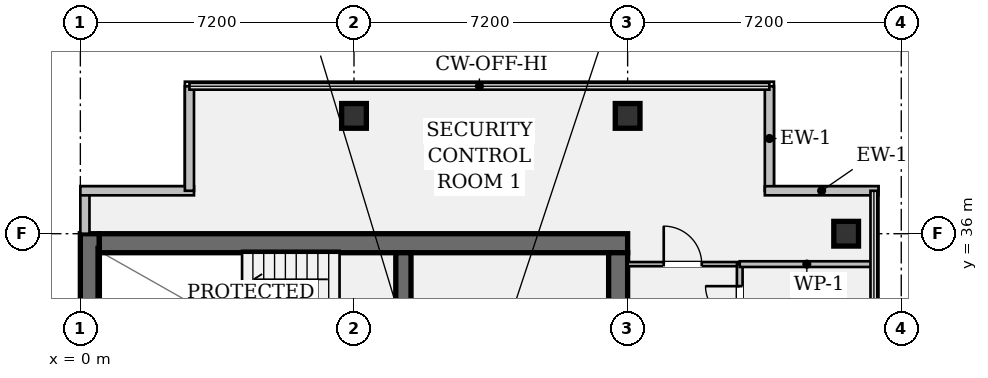
"""IFC4 building model, lengths in metres.
Left out: names, types, materials, properties, quantities, classifications, styles, units other than length and angle.
Written with IfcOpenShell. Run it as: python <this file> out.ifc"""

import sys

from ifc_helpers import new_model, si_unit, direction, frame, frame_2d, origin, origin_2d, place, context, subcontext, project, spatial, rectangle, hollow_rectangle, extrude, element, fill, save


model = new_model("IFC4")
c1 = context("Model", 3, precision=1e-05, world=origin(), true_north=direction((0.0, 1.0)))
c2 = subcontext(c1, "Body", "Model", "MODEL_VIEW")
j1 = project(units=[si_unit("LENGTHUNIT", "METRE"), si_unit("PLANEANGLEUNIT", "RADIAN")], contexts=[c1])
p1 = place(None, origin())
s1 = spatial("IfcSite", under=j1, at=p1, CompositionType="ELEMENT")
p2 = place(p1, origin())
s2 = spatial("IfcBuilding", under=s1, at=p2, CompositionType="ELEMENT")
p3 = place(p2, frame((0.0, 0.0, 244.65)))
s3 = spatial("IfcBuildingStorey", under=s2, at=p3, CompositionType="ELEMENT", Elevation=244.65)
p4 = place(p3, frame((0.25, 7.2, 0.0), z_axis=(0.0, 0.0, 1.0), x_axis=(0.0, 1.0, 0.0)))
e1 = element("IfcWall", 1, at=p4, inside=s3, PredefinedType="SHEAR", context=c2, shape_type="SweptSolid", body=[
    extrude(rectangle(XDim=28.8, YDim=0.5, at=frame_2d((14.4, 0.0))), origin(), (0.0, 0.0, 1.0), 3.24),
])
p5 = place(p3, frame((0.5, 35.75, 0.0), z_axis=(0.0, 0.0, 1.0), x_axis=(1.0, 0.0, 0.0)))
e2 = element("IfcWall", 2, at=p5, inside=s3, PredefinedType="SHEAR", context=c2, shape_type="SweptSolid", body=[
    extrude(rectangle(XDim=13.9, YDim=0.5, at=frame_2d((6.95, 0.0))), origin(), (0.0, 0.0, 1.0), 3.24),
])
p6 = place(p3, frame((14.15, 35.5, 0.0), z_axis=(0.0, 0.0, 1.0), x_axis=(0.0, -1.0, 0.0)))
e3 = element("IfcWall", 3, at=p6, inside=s3, PredefinedType="SHEAR", context=c2, shape_type="SweptSolid", body=[
    extrude(rectangle(XDim=27.8, YDim=0.5, at=frame_2d((13.9, 0.0))), origin(), (0.0, 0.0, 1.0), 3.24),
])
p7 = place(p6, frame((1.4, 0.0, 0.0)))
e4 = element("IfcOpeningElement", 4, at=p7, cuts=e3, PredefinedType="OPENING", context=c2, shape_type="SweptSolid", body=[
    extrude(rectangle(XDim=1.2, YDim=2.15, at=frame_2d((0.6, 1.075))), frame((0.0, 0.262, 0.0), z_axis=(0.0, -1.0, 0.0), x_axis=(1.0, 0.0, 0.0)), (0.0, 0.0, 1.0), 0.524),
])
p8 = place(p6, frame((25.35, 0.0, 0.0)))
e5 = element("IfcOpeningElement", 5, at=p8, cuts=e3, PredefinedType="OPENING", context=c2, shape_type="SweptSolid", body=[
    extrude(rectangle(XDim=1.2, YDim=2.15, at=frame_2d((0.6, 1.075))), frame((0.0, 0.262, 0.0), z_axis=(0.0, -1.0, 0.0), x_axis=(1.0, 0.0, 0.0)), (0.0, 0.0, 1.0), 0.524),
])
p9 = place(p6, frame((14.7, 0.0, 0.0)))
e6 = element("IfcOpeningElement", 6, at=p9, cuts=e3, PredefinedType="OPENING", context=c2, shape_type="SweptSolid", body=[
    extrude(rectangle(XDim=1.6, YDim=2.2, at=frame_2d((0.8, 1.1))), frame((0.0, 0.262, 0.0), z_axis=(0.0, -1.0, 0.0), x_axis=(1.0, 0.0, 0.0)), (0.0, 0.0, 1.0), 0.524),
])
p10 = place(p3, frame((8.5, 31.72, 0.0), z_axis=(0.0, 0.0, 1.0), x_axis=(0.0, 1.0, 0.0)))
e7 = element("IfcWall", 7, at=p10, inside=s3, PredefinedType="SHEAR", context=c2, shape_type="SweptSolid", body=[
    extrude(rectangle(XDim=3.78, YDim=0.4, at=frame_2d((1.89, 0.0))), origin(), (0.0, 0.0, 1.0), 3.24),
])
p11 = place(p10, frame((0.9, 0.0, 0.0)))
e8 = element("IfcOpeningElement", 8, at=p11, cuts=e7, PredefinedType="OPENING", context=c2, shape_type="SweptSolid", body=[
    extrude(rectangle(XDim=1.1, YDim=2.15, at=frame_2d((0.55, 1.075))), frame((0.0, 0.212, 0.0), z_axis=(0.0, -1.0, 0.0), x_axis=(1.0, 0.0, 0.0)), (0.0, 0.0, 1.0), 0.424),
])
for number, where, z_axis, x_axis in (
    (9, (7.2, 39.1, 0.0), (0.0, 0.0, 1.0), (1.0, 0.0, 0.0)),
    (10, (14.4, 39.1, 0.0), (0.0, 0.0, 1.0), (1.0, 0.0, 0.0)),
    (11, (20.15, 36.0, 0.0), (0.0, 0.0, 1.0), (1.0, 0.0, 0.0)),
):
    element("IfcColumn", number, at=place(p3, frame(where, z_axis=z_axis, x_axis=x_axis)), inside=s3, PredefinedType="COLUMN", context=c2, shape_type="SweptSolid", body=[
        extrude(hollow_rectangle(XDim=0.65, YDim=0.65, WallThickness=0.04, at=origin_2d()), origin(), (0.0, 0.0, 1.0), 3.24),
    ])
p12 = place(p3, frame((0.12, 36.0, 0.0), z_axis=(0.0, 0.0, 1.0), x_axis=(0.0, 1.0, 0.0)))
e12 = element("IfcWall", 12, at=p12, inside=s3, PredefinedType="STANDARD", context=c2, shape_type="SweptSolid", body=[
    extrude(rectangle(XDim=1.13, YDim=0.24, at=frame_2d((0.565, 0.0))), origin(), (0.0, 0.0, 1.0), 3.24),
])
p13 = place(p3, frame((0.0, 37.13, 0.0), z_axis=(0.0, 0.0, 1.0), x_axis=(1.0, 0.0, 0.0)))
e13 = element("IfcWall", 13, at=p13, inside=s3, PredefinedType="STANDARD", context=c2, shape_type="SweptSolid", body=[
    extrude(rectangle(XDim=2.99, YDim=0.24, at=frame_2d((1.495, 0.0))), origin(), (0.0, 0.0, 1.0), 3.24),
])
for number, where, z_axis, x_axis in (
    (14, (2.87, 37.13, 0.0), (0.0, 0.0, 1.0), (0.0, 1.0, 0.0)),
    (15, (18.13, 39.88, 0.0), (0.0, 0.0, 1.0), (0.0, -1.0, 0.0)),
):
    element("IfcWall", number, at=place(p3, frame(where, z_axis=z_axis, x_axis=x_axis)), inside=s3, PredefinedType="STANDARD", context=c2, shape_type="SweptSolid", body=[
        extrude(rectangle(XDim=2.75, YDim=0.24, at=frame_2d((1.375, 0.0))), origin(), (0.0, 0.0, 1.0), 3.24),
    ])
p14 = place(p3, frame((18.01, 37.13, 0.0), z_axis=(0.0, 0.0, 1.0), x_axis=(1.0, 0.0, 0.0)))
e16 = element("IfcWall", 16, at=p14, inside=s3, PredefinedType="STANDARD", context=c2, shape_type="SweptSolid", body=[
    extrude(rectangle(XDim=2.99, YDim=0.24, at=frame_2d((1.495, 0.0))), origin(), (0.0, 0.0, 1.0), 3.24),
])
p15 = place(p3, frame((14.4, 35.2, 0.0), z_axis=(0.0, 0.0, 1.0), x_axis=(1.0, 0.0, 0.0)))
e17 = element("IfcWall", 17, at=p15, inside=s3, PredefinedType="PARTITIONING", context=c2, shape_type="SweptSolid", body=[
    extrude(rectangle(XDim=2.95, YDim=0.11, at=frame_2d((1.475, 0.0))), origin(), (0.0, 0.0, 1.0), 2.808),
])
p16 = place(p15, frame((0.95, 0.0, 0.0)))
e18 = element("IfcOpeningElement", 18, at=p16, cuts=e17, PredefinedType="OPENING", context=c2, shape_type="SweptSolid", body=[
    extrude(rectangle(XDim=1.0, YDim=2.15, at=frame_2d((0.5, 1.075))), frame((0.0, 0.067, 0.0), z_axis=(0.0, -1.0, 0.0), x_axis=(1.0, 0.0, 0.0)), (0.0, 0.0, 1.0), 0.134),
])
p17 = place(p3, frame((17.35, 12.35, 0.0), z_axis=(0.0, 0.0, 1.0), x_axis=(0.0, 1.0, 0.0)))
e19 = element("IfcWall", 19, at=p17, inside=s3, PredefinedType="PARTITIONING", context=c2, shape_type="SweptSolid", body=[
    extrude(rectangle(XDim=22.85, YDim=0.15, at=frame_2d((11.425, 0.0))), origin(), (0.0, 0.0, 1.0), 2.676),
])
p18 = place(p17, frame((11.63, 0.0, 0.0)))
e20 = element("IfcOpeningElement", 20, at=p18, cuts=e19, PredefinedType="OPENING", context=c2, shape_type="SweptSolid", body=[
    extrude(rectangle(XDim=0.9, YDim=2.15, at=frame_2d((0.45, 1.075))), frame((0.0, 0.087, 0.0), z_axis=(0.0, -1.0, 0.0), x_axis=(1.0, 0.0, 0.0)), (0.0, 0.0, 1.0), 0.174),
])
p19 = place(p17, frame((14.88, 0.0, 0.0)))
e21 = element("IfcOpeningElement", 21, at=p19, cuts=e19, PredefinedType="OPENING", context=c2, shape_type="SweptSolid", body=[
    extrude(rectangle(XDim=0.9, YDim=2.15, at=frame_2d((0.45, 1.075))), frame((0.0, 0.087, 0.0), z_axis=(0.0, -1.0, 0.0), x_axis=(1.0, 0.0, 0.0)), (0.0, 0.0, 1.0), 0.174),
])
p20 = place(p17, frame((18.12, 0.0, 0.0)))
e22 = element("IfcOpeningElement", 22, at=p20, cuts=e19, PredefinedType="OPENING", context=c2, shape_type="SweptSolid", body=[
    extrude(rectangle(XDim=0.9, YDim=2.15, at=frame_2d((0.45, 1.075))), frame((0.0, 0.087, 0.0), z_axis=(0.0, -1.0, 0.0), x_axis=(1.0, 0.0, 0.0)), (0.0, 0.0, 1.0), 0.174),
])
p21 = place(p17, frame((21.37, 0.0, 0.0)))
e23 = element("IfcOpeningElement", 23, at=p21, cuts=e19, PredefinedType="OPENING", context=c2, shape_type="SweptSolid", body=[
    extrude(rectangle(XDim=0.9, YDim=2.15, at=frame_2d((0.45, 1.075))), frame((0.0, 0.087, 0.0), z_axis=(0.0, -1.0, 0.0), x_axis=(1.0, 0.0, 0.0)), (0.0, 0.0, 1.0), 0.174),
])
p22 = place(p3, frame((17.35, 35.2, 0.0), z_axis=(0.0, 0.0, 1.0), x_axis=(1.0, 0.0, 0.0)))
e24 = element("IfcWall", 24, at=p22, inside=s3, PredefinedType="PARTITIONING", context=c2, shape_type="SweptSolid", body=[
    extrude(rectangle(XDim=3.53, YDim=0.15, at=frame_2d((1.765, 0.0))), origin(), (0.0, 0.0, 1.0), 2.808),
])
p23 = place(p3, frame((20.9, 22.7, 0.0), z_axis=(0.0, 0.0, 1.0), x_axis=(0.0, 1.0, 0.0)))
e25 = element("IfcWall", 25, at=p23, inside=s3, PredefinedType="PARTITIONING", context=c2, shape_type="SweptSolid", body=[
    extrude(rectangle(XDim=12.5, YDim=0.11, at=frame_2d((6.25, 0.0))), origin(), (0.0, 0.0, 1.0), 3.24),
])
p24 = place(p16, origin())
e26 = element("IfcDoor", 26, at=p24, inside=s3, OperationType="SINGLE_SWING_LEFT", PredefinedType="DOOR", context=c2, shape_type="SweptSolid", body=[
    extrude(rectangle(XDim=1.0, YDim=2.15, at=frame_2d((0.5, 1.075))), frame((0.0, 0.025, 0.0), z_axis=(0.0, -1.0, 0.0), x_axis=(1.0, 0.0, 0.0)), (0.0, 0.0, 1.0), 0.05),
])
fill(e18, e26)
p25 = place(p21, origin())
e27 = element("IfcDoor", 27, at=p25, inside=s3, OperationType="SINGLE_SWING_RIGHT", PredefinedType="DOOR", context=c2, shape_type="SweptSolid", body=[
    extrude(rectangle(XDim=0.9, YDim=2.15, at=frame_2d((0.45, 1.075))), frame((0.0, 0.025, 0.0), z_axis=(0.0, -1.0, 0.0), x_axis=(1.0, 0.0, 0.0)), (0.0, 0.0, 1.0), 0.05),
])
fill(e23, e27)
save(model, sys.argv[1])
